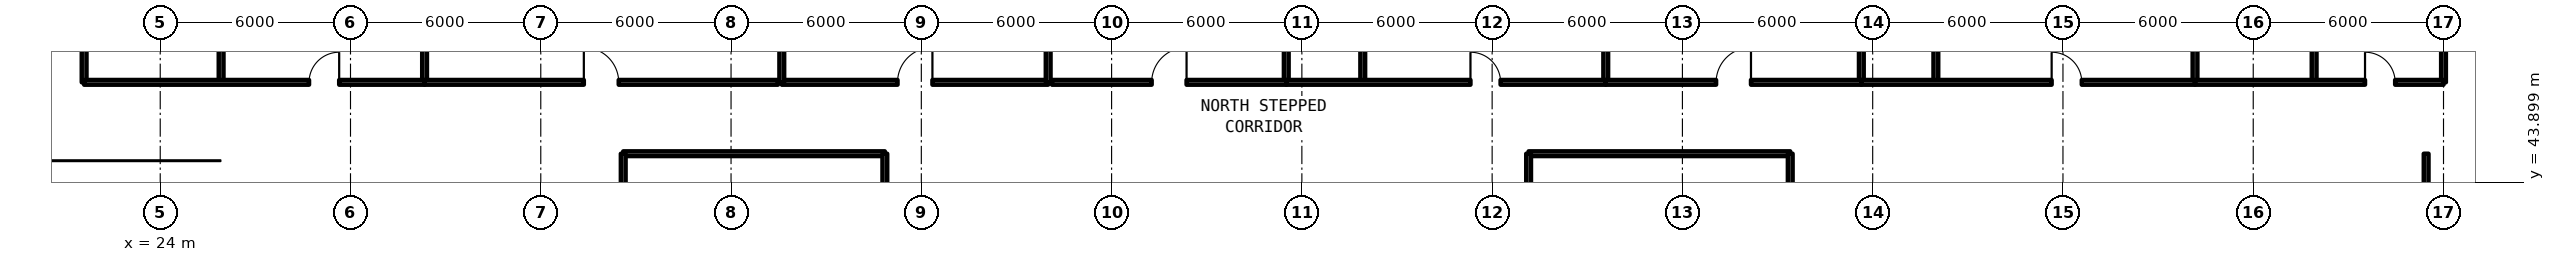
"""IFC4 building model, lengths in metres.
Left out: names, types, materials, properties, quantities, classifications, styles, units other than length and angle.
Written with IfcOpenShell. Run it as: python <this file> out.ifc"""

import sys

from ifc_helpers import new_model, si_unit, direction, frame, frame_2d, origin, place, context, subcontext, project, spatial, rectangle, extrude, element, fill, save


model = new_model("IFC4")
c1 = context("Model", 3, precision=1e-05, world=origin(), true_north=direction((0.0, 1.0)))
c2 = subcontext(c1, "Body", "Model", "MODEL_VIEW")
j1 = project(units=[si_unit("LENGTHUNIT", "METRE"), si_unit("PLANEANGLEUNIT", "RADIAN")], contexts=[c1])
p1 = place(None, origin())
s1 = spatial("IfcSite", under=j1, at=p1, CompositionType="ELEMENT")
p2 = place(p1, origin())
s2 = spatial("IfcBuilding", under=s1, at=p2, CompositionType="ELEMENT")
p3 = place(p2, frame((0.0, 0.0, 92.07)))
s3 = spatial("IfcBuildingStorey", under=s2, at=p3, CompositionType="ELEMENT", Elevation=92.07)
p4 = place(p3, frame((38.6, 44.8, 0.0), z_axis=(0.0, 0.0, 1.0), x_axis=(1.0, 0.0, 0.0)))
e1 = element("IfcWall", 1, at=p4, inside=s3, PredefinedType="SOLIDWALL", context=c2, shape_type="SweptSolid", body=[
    extrude(rectangle(XDim=8.25, YDim=0.15, at=frame_2d((4.125, 0.0))), origin(), (0.0, 0.0, 1.0), 2.35),
])
p5 = place(p3, frame((38.6, 22.4, 0.0), z_axis=(0.0, 0.0, 1.0), x_axis=(0.0, 1.0, 0.0)))
e2 = element("IfcWall", 2, at=p5, inside=s3, PredefinedType="SOLIDWALL", context=c2, shape_type="SweptSolid", body=[
    extrude(rectangle(XDim=22.4, YDim=0.15, at=frame_2d((11.2, 0.0))), origin(), (0.0, 0.0, 1.0), 2.35),
])
p6 = place(p5, frame((8.025, 0.0, 0.0)))
e3 = element("IfcOpeningElement", 3, at=p6, cuts=e2, PredefinedType="OPENING", context=c2, shape_type="SweptSolid", body=[
    extrude(rectangle(XDim=0.95, YDim=2.15, at=frame_2d((0.475, 1.075))), frame((0.0, 0.085, 0.0), z_axis=(0.0, -1.0, 0.0), x_axis=(1.0, 0.0, 0.0)), (0.0, 0.0, 1.0), 0.17),
])
p7 = place(p3, frame((46.85, 22.4, 0.0), z_axis=(0.0, 0.0, 1.0), x_axis=(0.0, 1.0, 0.0)))
e4 = element("IfcWall", 4, at=p7, inside=s3, PredefinedType="SOLIDWALL", context=c2, shape_type="SweptSolid", body=[
    extrude(rectangle(XDim=22.4, YDim=0.15, at=frame_2d((11.2, 0.0))), origin(), (0.0, 0.0, 1.0), 2.35),
])
p8 = place(p3, frame((67.15, 44.8, 0.0), z_axis=(0.0, 0.0, 1.0), x_axis=(1.0, 0.0, 0.0)))
e5 = element("IfcWall", 5, at=p8, inside=s3, PredefinedType="SOLIDWALL", context=c2, shape_type="SweptSolid", body=[
    extrude(rectangle(XDim=8.25, YDim=0.15, at=frame_2d((4.125, 0.0))), origin(), (0.0, 0.0, 1.0), 2.35),
])
p9 = place(p3, frame((67.15, 22.4, 0.0), z_axis=(0.0, 0.0, 1.0), x_axis=(0.0, 1.0, 0.0)))
e6 = element("IfcWall", 6, at=p9, inside=s3, PredefinedType="SOLIDWALL", context=c2, shape_type="SweptSolid", body=[
    extrude(rectangle(XDim=22.4, YDim=0.15, at=frame_2d((11.2, 0.0))), origin(), (0.0, 0.0, 1.0), 2.35),
])
p10 = place(p3, frame((75.4, 22.4, 0.0), z_axis=(0.0, 0.0, 1.0), x_axis=(0.0, 1.0, 0.0)))
e7 = element("IfcWall", 7, at=p10, inside=s3, PredefinedType="SOLIDWALL", context=c2, shape_type="SweptSolid", body=[
    extrude(rectangle(XDim=22.4, YDim=0.15, at=frame_2d((11.2, 0.0))), origin(), (0.0, 0.0, 1.0), 2.35),
])
p11 = place(p10, frame((8.025, 0.0, 0.0)))
e8 = element("IfcOpeningElement", 8, at=p11, cuts=e7, PredefinedType="OPENING", context=c2, shape_type="SweptSolid", body=[
    extrude(rectangle(XDim=0.95, YDim=2.15, at=frame_2d((0.475, 1.075))), frame((0.0, 0.085, 0.0), z_axis=(0.0, -1.0, 0.0), x_axis=(1.0, 0.0, 0.0)), (0.0, 0.0, 1.0), 0.17),
])
p12 = place(p3, frame((95.452, 39.6, 0.0), z_axis=(0.0, 0.0, 1.0), x_axis=(0.0, 1.0, 0.0)))
e9 = element("IfcWall", 9, at=p12, inside=s3, PredefinedType="PARTITIONING", context=c2, shape_type="SweptSolid", body=[
    extrude(rectangle(XDim=5.2, YDim=0.15, at=frame_2d((2.6, 0.0))), origin(), (0.0, 0.0, 1.0), 2.35),
])
p13 = place(p3, frame((43.6, 47.05, 0.0), z_axis=(0.0, 0.0, 1.0), x_axis=(1.0, 0.0, 0.0)))
e10 = element("IfcWall", 10, at=p13, inside=s3, PredefinedType="SOLIDWALL", context=c2, shape_type="SweptSolid", body=[
    extrude(rectangle(XDim=8.4, YDim=0.15, at=frame_2d((4.2, 0.0))), origin(), (0.0, 0.0, 1.0), 2.35),
])
p14 = place(p13, frame((3.65, 0.0, 0.0)))
e11 = element("IfcOpeningElement", 11, at=p14, cuts=e10, PredefinedType="OPENING", context=c2, shape_type="SweptSolid", body=[
    extrude(rectangle(XDim=1.1, YDim=2.15, at=frame_2d((0.55, 1.075))), frame((0.0, 0.085, 0.0), z_axis=(0.0, -1.0, 0.0), x_axis=(1.0, 0.0, 0.0)), (0.0, 0.0, 1.0), 0.17),
])
for number, where, z_axis, x_axis in (
    (12, (43.6, 47.05, 0.0), (0.0, 0.0, 1.0), (0.0, 1.0, 0.0)),
    (13, (52.0, 47.05, 0.0), (0.0, 0.0, 1.0), (0.0, 1.0, 0.0)),
    (14, (21.6, 47.05, 0.0), (0.0, 0.0, 1.0), (0.0, 1.0, 0.0)),
    (15, (32.336, 47.05, 0.0), (0.0, 0.0, 1.0), (0.0, 1.0, 0.0)),
):
    element("IfcWall", number, at=place(p3, frame(where, z_axis=z_axis, x_axis=x_axis)), inside=s3, PredefinedType="SOLIDWALL", context=c2, shape_type="SweptSolid", body=[
        extrude(rectangle(XDim=10.3, YDim=0.15, at=frame_2d((5.15, 0.0))), origin(), (0.0, 0.0, 1.0), 2.35),
    ])
p15 = place(p3, frame((25.92, 47.05, 0.0), z_axis=(0.0, 0.0, 1.0), x_axis=(0.0, 1.0, 0.0)))
e16 = element("IfcWall", 16, at=p15, inside=s3, PredefinedType="PARTITIONING", context=c2, shape_type="SweptSolid", body=[
    extrude(rectangle(XDim=5.557, YDim=0.15, at=frame_2d((2.779, 0.0))), origin(), (0.0, 0.0, 1.0), 2.35),
])
p16 = place(p15, frame((1.214, 0.0, 0.0)))
e17 = element("IfcOpeningElement", 17, at=p16, cuts=e16, PredefinedType="OPENING", context=c2, shape_type="SweptSolid", body=[
    extrude(rectangle(XDim=0.85, YDim=2.1, at=frame_2d((0.425, 1.05))), frame((0.0, 0.085, 0.0), z_axis=(0.0, -1.0, 0.0), x_axis=(1.0, 0.0, 0.0)), (0.0, 0.0, 1.0), 0.17),
])
p17 = place(p15, frame((3.993, 0.0, 0.0)))
e18 = element("IfcOpeningElement", 18, at=p17, cuts=e16, PredefinedType="OPENING", context=c2, shape_type="SweptSolid", body=[
    extrude(rectangle(XDim=0.85, YDim=2.1, at=frame_2d((0.425, 1.05))), frame((0.0, 0.085, 0.0), z_axis=(0.0, -1.0, 0.0), x_axis=(1.0, 0.0, 0.0)), (0.0, 0.0, 1.0), 0.17),
])
p18 = place(p3, frame((21.6, 47.05, 0.0), z_axis=(0.0, 0.0, 1.0), x_axis=(1.0, 0.0, 0.0)))
e19 = element("IfcWall", 19, at=p18, inside=s3, PredefinedType="SOLIDWALL", context=c2, shape_type="SweptSolid", body=[
    extrude(rectangle(XDim=10.736, YDim=0.15, at=frame_2d((5.368, 0.0))), origin(), (0.0, 0.0, 1.0), 2.35),
])
p19 = place(p18, frame((7.093, 0.0, 0.0)))
e20 = element("IfcOpeningElement", 20, at=p19, cuts=e19, PredefinedType="OPENING", context=c2, shape_type="SweptSolid", body=[
    extrude(rectangle(XDim=0.95, YDim=2.15, at=frame_2d((0.475, 1.075))), frame((0.0, 0.085, 0.0), z_axis=(0.0, -1.0, 0.0), x_axis=(1.0, 0.0, 0.0)), (0.0, 0.0, 1.0), 0.17),
])
p20 = place(p3, frame((32.336, 47.05, 0.0), z_axis=(0.0, 0.0, 1.0), x_axis=(1.0, 0.0, 0.0)))
e21 = element("IfcWall", 21, at=p20, inside=s3, PredefinedType="SOLIDWALL", context=c2, shape_type="SweptSolid", body=[
    extrude(rectangle(XDim=11.144, YDim=0.15, at=frame_2d((5.572, 0.0))), origin(), (0.0, 0.0, 1.0), 2.35),
])
p21 = place(p20, frame((5.022, 0.0, 0.0)))
e22 = element("IfcOpeningElement", 22, at=p21, cuts=e21, PredefinedType="OPENING", context=c2, shape_type="SweptSolid", body=[
    extrude(rectangle(XDim=1.1, YDim=2.15, at=frame_2d((0.55, 1.075))), frame((0.0, 0.085, 0.0), z_axis=(0.0, -1.0, 0.0), x_axis=(1.0, 0.0, 0.0)), (0.0, 0.0, 1.0), 0.17),
])
for number, where, z_axis, x_axis in (
    (23, (96.0, 47.05, 0.0), (0.0, 0.0, 1.0), (0.0, 1.0, 0.0)),
    (24, (59.508, 47.05, 0.0), (0.0, 0.0, 1.0), (0.0, 1.0, 0.0)),
):
    element("IfcWall", number, at=place(p3, frame(where, z_axis=z_axis, x_axis=x_axis)), inside=s3, PredefinedType="SOLIDWALL", context=c2, shape_type="SweptSolid", body=[
        extrude(rectangle(XDim=10.3, YDim=0.15, at=frame_2d((5.15, 0.0))), origin(), (0.0, 0.0, 1.0), 2.35),
    ])
p22 = place(p3, frame((52.12, 47.05, 0.0), z_axis=(0.0, 0.0, 1.0), x_axis=(1.0, 0.0, 0.0)))
e25 = element("IfcWall", 25, at=p22, inside=s3, PredefinedType="SOLIDWALL", context=c2, shape_type="SweptSolid", body=[
    extrude(rectangle(XDim=7.388, YDim=0.15, at=frame_2d((3.694, 0.0))), origin(), (0.0, 0.0, 1.0), 2.35),
])
p23 = place(p22, frame((3.144, 0.0, 0.0)))
e26 = element("IfcOpeningElement", 26, at=p23, cuts=e25, PredefinedType="OPENING", context=c2, shape_type="SweptSolid", body=[
    extrude(rectangle(XDim=1.1, YDim=2.15, at=frame_2d((0.55, 1.075))), frame((0.0, 0.085, 0.0), z_axis=(0.0, -1.0, 0.0), x_axis=(1.0, 0.0, 0.0)), (0.0, 0.0, 1.0), 0.17),
])
p24 = place(p3, frame((69.583, 47.05, 0.0), z_axis=(0.0, 0.0, 1.0), x_axis=(0.0, 1.0, 0.0)))
e27 = element("IfcWall", 27, at=p24, inside=s3, PredefinedType="SOLIDWALL", context=c2, shape_type="SweptSolid", body=[
    extrude(rectangle(XDim=10.3, YDim=0.15, at=frame_2d((5.15, 0.0))), origin(), (0.0, 0.0, 1.0), 2.35),
])
p25 = place(p3, frame((61.92, 47.05, 0.0), z_axis=(0.0, 0.0, 1.0), x_axis=(0.0, 1.0, 0.0)))
e28 = element("IfcWall", 28, at=p25, inside=s3, PredefinedType="PARTITIONING", context=c2, shape_type="SweptSolid", body=[
    extrude(rectangle(XDim=5.1, YDim=0.15, at=frame_2d((2.55, 0.0))), origin(), (0.0, 0.0, 1.0), 2.35),
])
p26 = place(p25, frame((1.08, 0.0, 0.0)))
e29 = element("IfcOpeningElement", 29, at=p26, cuts=e28, PredefinedType="OPENING", context=c2, shape_type="SweptSolid", body=[
    extrude(rectangle(XDim=0.85, YDim=2.1, at=frame_2d((0.425, 1.05))), frame((0.0, 0.085, 0.0), z_axis=(0.0, -1.0, 0.0), x_axis=(1.0, 0.0, 0.0)), (0.0, 0.0, 1.0), 0.17),
])
p27 = place(p25, frame((3.629, 0.0, 0.0)))
e30 = element("IfcOpeningElement", 30, at=p27, cuts=e28, PredefinedType="OPENING", context=c2, shape_type="SweptSolid", body=[
    extrude(rectangle(XDim=0.85, YDim=2.1, at=frame_2d((0.425, 1.05))), frame((0.0, 0.085, 0.0), z_axis=(0.0, -1.0, 0.0), x_axis=(1.0, 0.0, 0.0)), (0.0, 0.0, 1.0), 0.17),
])
p28 = place(p3, frame((59.508, 47.05, 0.0), z_axis=(0.0, 0.0, 1.0), x_axis=(1.0, 0.0, 0.0)))
e31 = element("IfcWall", 31, at=p28, inside=s3, PredefinedType="SOLIDWALL", context=c2, shape_type="SweptSolid", body=[
    extrude(rectangle(XDim=10.074, YDim=0.15, at=frame_2d((5.037, 0.0))), origin(), (0.0, 0.0, 1.0), 2.35),
])
p29 = place(p28, frame((5.808, 0.0, 0.0)))
e32 = element("IfcOpeningElement", 32, at=p29, cuts=e31, PredefinedType="OPENING", context=c2, shape_type="SweptSolid", body=[
    extrude(rectangle(XDim=0.95, YDim=2.15, at=frame_2d((0.475, 1.075))), frame((0.0, 0.085, 0.0), z_axis=(0.0, -1.0, 0.0), x_axis=(1.0, 0.0, 0.0)), (0.0, 0.0, 1.0), 0.17),
])
p30 = place(p3, frame((77.642, 47.05, 0.0), z_axis=(0.0, 0.0, 1.0), x_axis=(0.0, 1.0, 0.0)))
e33 = element("IfcWall", 33, at=p30, inside=s3, PredefinedType="SOLIDWALL", context=c2, shape_type="SweptSolid", body=[
    extrude(rectangle(XDim=10.3, YDim=0.15, at=frame_2d((5.15, 0.0))), origin(), (0.0, 0.0, 1.0), 2.35),
])
p31 = place(p3, frame((69.583, 47.05, 0.0), z_axis=(0.0, 0.0, 1.0), x_axis=(1.0, 0.0, 0.0)))
e34 = element("IfcWall", 34, at=p31, inside=s3, PredefinedType="SOLIDWALL", context=c2, shape_type="SweptSolid", body=[
    extrude(rectangle(XDim=8.06, YDim=0.15, at=frame_2d((4.03, 0.0))), origin(), (0.0, 0.0, 1.0), 2.35),
])
p32 = place(p31, frame((3.48, 0.0, 0.0)))
e35 = element("IfcOpeningElement", 35, at=p32, cuts=e34, PredefinedType="OPENING", context=c2, shape_type="SweptSolid", body=[
    extrude(rectangle(XDim=1.1, YDim=2.15, at=frame_2d((0.55, 1.075))), frame((0.0, 0.085, 0.0), z_axis=(0.0, -1.0, 0.0), x_axis=(1.0, 0.0, 0.0)), (0.0, 0.0, 1.0), 0.17),
])
p33 = place(p3, frame((88.164, 47.05, 0.0), z_axis=(0.0, 0.0, 1.0), x_axis=(0.0, 1.0, 0.0)))
e36 = element("IfcWall", 36, at=p33, inside=s3, PredefinedType="SOLIDWALL", context=c2, shape_type="SweptSolid", body=[
    extrude(rectangle(XDim=10.3, YDim=0.15, at=frame_2d((5.15, 0.0))), origin(), (0.0, 0.0, 1.0), 2.35),
])
p34 = place(p3, frame((79.992, 47.05, 0.0), z_axis=(0.0, 0.0, 1.0), x_axis=(0.0, 1.0, 0.0)))
e37 = element("IfcWall", 37, at=p34, inside=s3, PredefinedType="PARTITIONING", context=c2, shape_type="SweptSolid", body=[
    extrude(rectangle(XDim=5.1, YDim=0.15, at=frame_2d((2.55, 0.0))), origin(), (0.0, 0.0, 1.0), 2.35),
])
p35 = place(p34, frame((1.08, 0.0, 0.0)))
e38 = element("IfcOpeningElement", 38, at=p35, cuts=e37, PredefinedType="OPENING", context=c2, shape_type="SweptSolid", body=[
    extrude(rectangle(XDim=0.85, YDim=2.1, at=frame_2d((0.425, 1.05))), frame((0.0, 0.085, 0.0), z_axis=(0.0, -1.0, 0.0), x_axis=(1.0, 0.0, 0.0)), (0.0, 0.0, 1.0), 0.17),
])
p36 = place(p34, frame((3.629, 0.0, 0.0)))
e39 = element("IfcOpeningElement", 39, at=p36, cuts=e37, PredefinedType="OPENING", context=c2, shape_type="SweptSolid", body=[
    extrude(rectangle(XDim=0.85, YDim=2.1, at=frame_2d((0.425, 1.05))), frame((0.0, 0.085, 0.0), z_axis=(0.0, -1.0, 0.0), x_axis=(1.0, 0.0, 0.0)), (0.0, 0.0, 1.0), 0.17),
])
p37 = place(p3, frame((77.642, 47.05, 0.0), z_axis=(0.0, 0.0, 1.0), x_axis=(1.0, 0.0, 0.0)))
e40 = element("IfcWall", 40, at=p37, inside=s3, PredefinedType="SOLIDWALL", context=c2, shape_type="SweptSolid", body=[
    extrude(rectangle(XDim=10.522, YDim=0.15, at=frame_2d((5.261, 0.0))), origin(), (0.0, 0.0, 1.0), 2.35),
])
p38 = place(p37, frame((6.001, 0.0, 0.0)))
e41 = element("IfcOpeningElement", 41, at=p38, cuts=e40, PredefinedType="OPENING", context=c2, shape_type="SweptSolid", body=[
    extrude(rectangle(XDim=0.95, YDim=2.15, at=frame_2d((0.475, 1.075))), frame((0.0, 0.085, 0.0), z_axis=(0.0, -1.0, 0.0), x_axis=(1.0, 0.0, 0.0)), (0.0, 0.0, 1.0), 0.17),
])
p39 = place(p3, frame((91.92, 47.05, 0.0), z_axis=(0.0, 0.0, 1.0), x_axis=(0.0, 1.0, 0.0)))
e42 = element("IfcWall", 42, at=p39, inside=s3, PredefinedType="PARTITIONING", context=c2, shape_type="SweptSolid", body=[
    extrude(rectangle(XDim=6.535, YDim=0.15, at=frame_2d((3.268, 0.0))), origin(), (0.0, 0.0, 1.0), 2.35),
])
p40 = place(p39, frame((1.503, 0.0, 0.0)))
e43 = element("IfcOpeningElement", 43, at=p40, cuts=e42, PredefinedType="OPENING", context=c2, shape_type="SweptSolid", body=[
    extrude(rectangle(XDim=0.85, YDim=2.1, at=frame_2d((0.425, 1.05))), frame((0.0, 0.085, 0.0), z_axis=(0.0, -1.0, 0.0), x_axis=(1.0, 0.0, 0.0)), (0.0, 0.0, 1.0), 0.17),
])
p41 = place(p39, frame((4.771, 0.0, 0.0)))
e44 = element("IfcOpeningElement", 44, at=p41, cuts=e42, PredefinedType="OPENING", context=c2, shape_type="SweptSolid", body=[
    extrude(rectangle(XDim=0.85, YDim=2.1, at=frame_2d((0.425, 1.05))), frame((0.0, 0.085, 0.0), z_axis=(0.0, -1.0, 0.0), x_axis=(1.0, 0.0, 0.0)), (0.0, 0.0, 1.0), 0.17),
])
p42 = place(p3, frame((88.164, 47.05, 0.0), z_axis=(0.0, 0.0, 1.0), x_axis=(1.0, 0.0, 0.0)))
e45 = element("IfcWall", 45, at=p42, inside=s3, PredefinedType="SOLIDWALL", context=c2, shape_type="SweptSolid", body=[
    extrude(rectangle(XDim=7.836, YDim=0.15, at=frame_2d((3.918, 0.0))), origin(), (0.0, 0.0, 1.0), 2.35),
])
p43 = place(p42, frame((5.361, 0.0, 0.0)))
e46 = element("IfcOpeningElement", 46, at=p43, cuts=e45, PredefinedType="OPENING", context=c2, shape_type="SweptSolid", body=[
    extrude(rectangle(XDim=0.95, YDim=2.15, at=frame_2d((0.475, 1.075))), frame((0.0, 0.085, 0.0), z_axis=(0.0, -1.0, 0.0), x_axis=(1.0, 0.0, 0.0)), (0.0, 0.0, 1.0), 0.17),
])
p44 = place(p14, origin())
e47 = element("IfcDoor", 47, at=p44, inside=s3, OperationType="SINGLE_SWING_RIGHT", PredefinedType="DOOR", context=c2, shape_type="SweptSolid", body=[
    extrude(rectangle(XDim=1.1, YDim=2.15, at=frame_2d((0.55, 1.075))), frame((0.0, 0.025, 0.0), z_axis=(0.0, -1.0, 0.0), x_axis=(1.0, 0.0, 0.0)), (0.0, 0.0, 1.0), 0.05),
])
fill(e11, e47)
p45 = place(p19, origin())
e48 = element("IfcDoor", 48, at=p45, inside=s3, OperationType="SINGLE_SWING_RIGHT", PredefinedType="DOOR", context=c2, shape_type="SweptSolid", body=[
    extrude(rectangle(XDim=0.95, YDim=2.15, at=frame_2d((0.475, 1.075))), frame((0.0, 0.025, 0.0), z_axis=(0.0, -1.0, 0.0), x_axis=(1.0, 0.0, 0.0)), (0.0, 0.0, 1.0), 0.05),
])
fill(e20, e48)
p46 = place(p21, origin())
e49 = element("IfcDoor", 49, at=p46, inside=s3, OperationType="SINGLE_SWING_LEFT", PredefinedType="DOOR", context=c2, shape_type="SweptSolid", body=[
    extrude(rectangle(XDim=1.1, YDim=2.15, at=frame_2d((0.55, 1.075))), frame((0.0, 0.025, 0.0), z_axis=(0.0, -1.0, 0.0), x_axis=(1.0, 0.0, 0.0)), (0.0, 0.0, 1.0), 0.05),
])
fill(e22, e49)
p47 = place(p23, origin())
e50 = element("IfcDoor", 50, at=p47, inside=s3, OperationType="SINGLE_SWING_RIGHT", PredefinedType="DOOR", context=c2, shape_type="SweptSolid", body=[
    extrude(rectangle(XDim=1.1, YDim=2.15, at=frame_2d((0.55, 1.075))), frame((0.0, 0.025, 0.0), z_axis=(0.0, -1.0, 0.0), x_axis=(1.0, 0.0, 0.0)), (0.0, 0.0, 1.0), 0.05),
])
fill(e26, e50)
p48 = place(p29, origin())
e51 = element("IfcDoor", 51, at=p48, inside=s3, OperationType="SINGLE_SWING_LEFT", PredefinedType="DOOR", context=c2, shape_type="SweptSolid", body=[
    extrude(rectangle(XDim=0.95, YDim=2.15, at=frame_2d((0.475, 1.075))), frame((0.0, 0.025, 0.0), z_axis=(0.0, -1.0, 0.0), x_axis=(1.0, 0.0, 0.0)), (0.0, 0.0, 1.0), 0.05),
])
fill(e32, e51)
p49 = place(p32, origin())
e52 = element("IfcDoor", 52, at=p49, inside=s3, OperationType="SINGLE_SWING_RIGHT", PredefinedType="DOOR", context=c2, shape_type="SweptSolid", body=[
    extrude(rectangle(XDim=1.1, YDim=2.15, at=frame_2d((0.55, 1.075))), frame((0.0, 0.025, 0.0), z_axis=(0.0, -1.0, 0.0), x_axis=(1.0, 0.0, 0.0)), (0.0, 0.0, 1.0), 0.05),
])
fill(e35, e52)
p50 = place(p38, origin())
e53 = element("IfcDoor", 53, at=p50, inside=s3, OperationType="SINGLE_SWING_LEFT", PredefinedType="DOOR", context=c2, shape_type="SweptSolid", body=[
    extrude(rectangle(XDim=0.95, YDim=2.15, at=frame_2d((0.475, 1.075))), frame((0.0, 0.025, 0.0), z_axis=(0.0, -1.0, 0.0), x_axis=(1.0, 0.0, 0.0)), (0.0, 0.0, 1.0), 0.05),
])
fill(e41, e53)
p51 = place(p43, origin())
e54 = element("IfcDoor", 54, at=p51, inside=s3, OperationType="SINGLE_SWING_LEFT", PredefinedType="DOOR", context=c2, shape_type="SweptSolid", body=[
    extrude(rectangle(XDim=0.95, YDim=2.15, at=frame_2d((0.475, 1.075))), frame((0.0, 0.025, 0.0), z_axis=(0.0, -1.0, 0.0), x_axis=(1.0, 0.0, 0.0)), (0.0, 0.0, 1.0), 0.05),
])
fill(e46, e54)
save(model, sys.argv[1])
